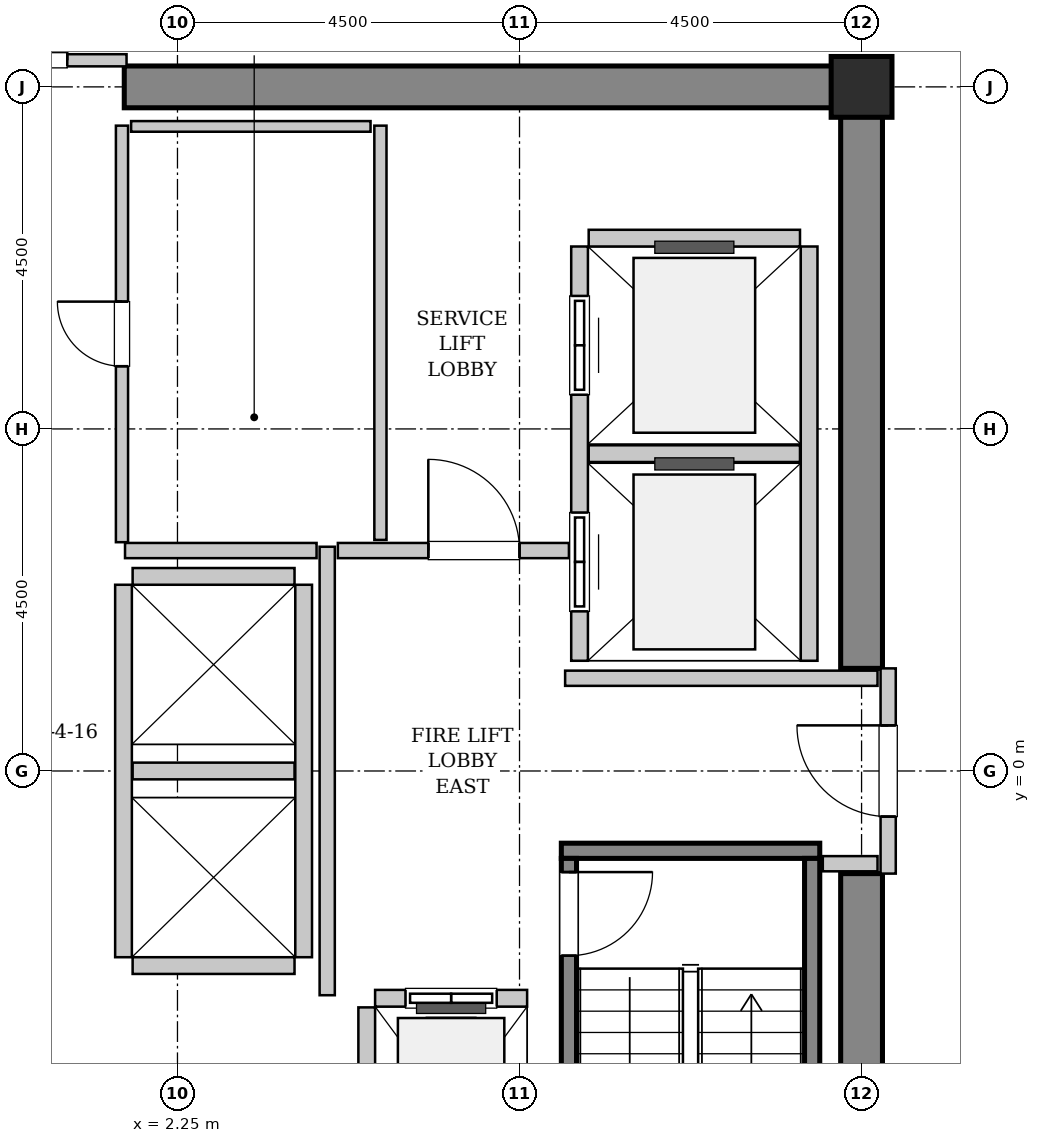
"""IFC4 building model, lengths in metres.
Left out: names, types, materials, properties, quantities, classifications, styles, units other than length and angle.
Written with IfcOpenShell. Run it as: python <this file> out.ifc"""

import sys

from ifc_helpers import new_model, si_unit, direction, frame, frame_2d, origin, origin_2d, place, context, subcontext, project, spatial, rectangle, hollow_rectangle, extrude, source, transform, mapped, element, fill, save


model = new_model("IFC4")
c1 = context("Model", 3, precision=1e-05, world=origin(), true_north=direction((0.0, 1.0)))
c2 = subcontext(c1, "Body", "Model", "MODEL_VIEW")
j1 = project(units=[si_unit("LENGTHUNIT", "METRE"), si_unit("PLANEANGLEUNIT", "RADIAN")], contexts=[c1])
p1 = place(None, origin())
s1 = spatial("IfcSite", under=j1, at=p1, CompositionType="ELEMENT")
p2 = place(p1, origin())
s2 = spatial("IfcBuilding", under=s1, at=p2, CompositionType="ELEMENT")
p3 = place(p2, frame((0.0, 0.0, 194.4)))
s3 = spatial("IfcBuildingStorey", under=s2, at=p3, CompositionType="ELEMENT", Elevation=194.4)
m1 = source(origin(), c2, "Body", "SweptSolid", [
    extrude(rectangle(XDim=9.975, YDim=0.55, at=frame_2d((4.987, 0.0))), origin(), (0.0, 0.0, 1.0), 3.8),
])
p4 = place(p3, frame((1.55, 9.0, 0.0), z_axis=(0.0, 0.0, 1.0), x_axis=(1.0, 0.0, 0.0)))
e1 = element("IfcWall", 1, at=p4, inside=s3, PredefinedType="SHEAR", context=c2, shape_type="MappedRepresentation", body=[
    mapped(m1, transform((0.0, 0.0, 0.0), x_axis=(1.0, 0.0, 0.0), y_axis=(0.0, 1.0, 0.0), z_axis=(0.0, 0.0, 1.0), scale=1.0)),
])
m2 = source(origin(), c2, "Body", "SweptSolid", [
    extrude(rectangle(XDim=7.375, YDim=0.55, at=frame_2d((3.688, 0.0))), origin(), (0.0, 0.0, 1.0), 3.8),
])
for number, where, z_axis, x_axis in (
    (2, (11.25, -8.725, 0.0), (0.0, 0.0, 1.0), (0.0, 1.0, 0.0)),
    (3, (11.25, 1.35, 0.0), (0.0, 0.0, 1.0), (0.0, 1.0, 0.0)),
):
    element("IfcWall", number, at=place(p3, frame(where, z_axis=z_axis, x_axis=x_axis)), inside=s3, PredefinedType="SHEAR", context=c2, shape_type="MappedRepresentation", body=[
        mapped(m2, transform((0.0, 0.0, 0.0), x_axis=(1.0, 0.0, 0.0), y_axis=(0.0, 1.0, 0.0), z_axis=(0.0, 0.0, 1.0), scale=1.0)),
    ])
m3 = source(origin(), c2, "Body", "SweptSolid", [
    extrude(hollow_rectangle(XDim=0.8, YDim=0.8, WallThickness=0.04, InnerFilletRadius=0.04, OuterFilletRadius=0.08, at=origin_2d()), origin(), (0.0, 0.0, 1.0), 3.8),
])
p5 = place(p3, frame((11.25, 9.0, 0.0), z_axis=(0.0, 0.0, 1.0), x_axis=(1.0, 0.0, 0.0)))
e4 = element("IfcColumn", 4, at=p5, inside=s3, PredefinedType="COLUMN", context=c2, shape_type="MappedRepresentation", body=[
    mapped(m3, transform((0.0, 0.0, 0.0), x_axis=(1.0, 0.0, 0.0), y_axis=(0.0, 1.0, 0.0), z_axis=(0.0, 0.0, 1.0), scale=1.0)),
])
m4 = source(origin(), c2, "Body", "SweptSolid", [
    extrude(rectangle(XDim=3.4, YDim=0.2, at=frame_2d((1.7, 0.0))), origin(), (0.0, 0.0, 1.0), 3.8),
])
p6 = place(p3, frame((7.3, -1.05, 0.0), z_axis=(0.0, 0.0, 1.0), x_axis=(1.0, 0.0, 0.0)))
e5 = element("IfcWall", 5, at=p6, inside=s3, PredefinedType="SOLIDWALL", context=c2, shape_type="MappedRepresentation", body=[
    mapped(m4, transform((0.0, 0.0, 0.0), x_axis=(1.0, 0.0, 0.0), y_axis=(0.0, 1.0, 0.0), z_axis=(0.0, 0.0, 1.0), scale=1.0)),
])
m5 = source(origin(), c2, "Body", "SweptSolid", [
    extrude(rectangle(XDim=7.1, YDim=0.2, at=frame_2d((3.55, 0.0))), origin(), (0.0, 0.0, 1.0), 3.8),
])
p7 = place(p3, frame((7.4, -1.15, 0.0), z_axis=(0.0, 0.0, 1.0), x_axis=(0.0, -1.0, 0.0)))
e6 = element("IfcWall", 6, at=p7, inside=s3, PredefinedType="SOLIDWALL", context=c2, shape_type="MappedRepresentation", body=[
    mapped(m5, transform((0.0, 0.0, 0.0), x_axis=(1.0, 0.0, 0.0), y_axis=(0.0, 1.0, 0.0), z_axis=(0.0, 0.0, 1.0), scale=1.0)),
])
p8 = place(p7, frame((0.18, 0.0, 0.0)))
e7 = element("IfcOpeningElement", 7, at=p8, cuts=e6, PredefinedType="OPENING", context=c2, shape_type="SweptSolid", body=[
    extrude(rectangle(XDim=1.1, YDim=2.15, at=frame_2d((0.55, 1.075))), frame((0.0, 0.11, 0.0), z_axis=(0.0, -1.0, 0.0), x_axis=(1.0, 0.0, 0.0)), (0.0, 0.0, 1.0), 0.22),
])
p9 = place(p3, frame((10.6, -1.15, 0.0), z_axis=(0.0, 0.0, 1.0), x_axis=(0.0, -1.0, 0.0)))
e8 = element("IfcWall", 8, at=p9, inside=s3, PredefinedType="SOLIDWALL", context=c2, shape_type="MappedRepresentation", body=[
    mapped(m5, transform((0.0, 0.0, 0.0), x_axis=(1.0, 0.0, 0.0), y_axis=(0.0, 1.0, 0.0), z_axis=(0.0, 0.0, 1.0), scale=1.0)),
])
m6 = source(origin(), c2, "Body", "SweptSolid", [
    extrude(rectangle(XDim=2.0, YDim=0.22, at=frame_2d((1.0, 0.0))), origin(), (0.0, 0.0, 1.0), 3.535),
])
p10 = place(p3, frame((6.85, -2.99, 0.0), z_axis=(0.0, 0.0, 1.0), x_axis=(-1.0, 0.0, 0.0)))
e9 = element("IfcWall", 9, at=p10, inside=s3, PredefinedType="SOLIDWALL", context=c2, shape_type="MappedRepresentation", body=[
    mapped(m6, transform((0.0, 0.0, 0.0), x_axis=(1.0, 0.0, 0.0), y_axis=(0.0, 1.0, 0.0), z_axis=(0.0, 0.0, 1.0), scale=1.0)),
])
p11 = place(p10, frame((0.4, 0.0, 0.0)))
e10 = element("IfcOpeningElement", 10, at=p11, cuts=e9, PredefinedType="OPENING", context=c2, shape_type="SweptSolid", body=[
    extrude(rectangle(XDim=1.2, YDim=2.2, at=frame_2d((0.6, 1.1))), frame((0.0, 0.12, 0.0), z_axis=(0.0, -1.0, 0.0), x_axis=(1.0, 0.0, 0.0)), (0.0, 0.0, 1.0), 0.24),
])
m7 = source(origin(), c2, "Body", "SweptSolid", [
    extrude(rectangle(XDim=2.68, YDim=0.22, at=frame_2d((1.34, 0.0))), origin(), (0.0, 0.0, 1.0), 3.535),
])
p12 = place(p3, frame((4.74, -3.11, 0.0), z_axis=(0.0, 0.0, 1.0), x_axis=(0.0, -1.0, 0.0)))
e11 = element("IfcWall", 11, at=p12, inside=s3, PredefinedType="SOLIDWALL", context=c2, shape_type="MappedRepresentation", body=[
    mapped(m7, transform((0.0, 0.0, 0.0), x_axis=(1.0, 0.0, 0.0), y_axis=(0.0, 1.0, 0.0), z_axis=(0.0, 0.0, 1.0), scale=1.0)),
])
m8 = source(origin(), c2, "Body", "SweptSolid", [
    extrude(rectangle(XDim=5.45, YDim=0.22, at=frame_2d((2.725, 0.0))), origin(), (0.0, 0.0, 1.0), 3.535),
])
p13 = place(p3, frame((7.54, 6.9, 0.0), z_axis=(0.0, 0.0, 1.0), x_axis=(0.0, -1.0, 0.0)))
e12 = element("IfcWall", 12, at=p13, inside=s3, PredefinedType="SOLIDWALL", context=c2, shape_type="MappedRepresentation", body=[
    mapped(m8, transform((0.0, 0.0, 0.0), x_axis=(1.0, 0.0, 0.0), y_axis=(0.0, 1.0, 0.0), z_axis=(0.0, 0.0, 1.0), scale=1.0)),
])
p14 = place(p13, frame((3.5, 0.0, 0.0)))
e13 = element("IfcOpeningElement", 13, at=p14, cuts=e12, PredefinedType="OPENING", context=c2, shape_type="SweptSolid", body=[
    extrude(rectangle(XDim=1.3, YDim=2.3, at=frame_2d((0.65, 1.15))), frame((0.0, 0.12, 0.0), z_axis=(0.0, -1.0, 0.0), x_axis=(1.0, 0.0, 0.0)), (0.0, 0.0, 1.0), 0.24),
])
p15 = place(p13, frame((0.65, 0.0, 0.0)))
e14 = element("IfcOpeningElement", 14, at=p15, cuts=e12, PredefinedType="OPENING", context=c2, shape_type="SweptSolid", body=[
    extrude(rectangle(XDim=1.3, YDim=2.3, at=frame_2d((0.65, 1.15))), frame((0.0, 0.12, 0.0), z_axis=(0.0, -1.0, 0.0), x_axis=(1.0, 0.0, 0.0)), (0.0, 0.0, 1.0), 0.24),
])
p16 = place(p3, frame((10.56, 1.45, 0.0), z_axis=(0.0, 0.0, 1.0), x_axis=(0.0, 1.0, 0.0)))
e15 = element("IfcWall", 15, at=p16, inside=s3, PredefinedType="SOLIDWALL", context=c2, shape_type="MappedRepresentation", body=[
    mapped(m8, transform((0.0, 0.0, 0.0), x_axis=(1.0, 0.0, 0.0), y_axis=(0.0, 1.0, 0.0), z_axis=(0.0, 0.0, 1.0), scale=1.0)),
])
m9 = source(origin(), c2, "Body", "SweptSolid", [
    extrude(rectangle(XDim=2.78, YDim=0.22, at=frame_2d((1.39, 0.0))), origin(), (0.0, 0.0, 1.0), 3.535),
])
for number, where, z_axis, x_axis in (
    (16, (7.66, 4.175, 0.0), (0.0, 0.0, 1.0), (1.0, 0.0, 0.0)),
    (17, (10.44, 7.01, 0.0), (0.0, 0.0, 1.0), (-1.0, 0.0, 0.0)),
):
    element("IfcWall", number, at=place(p3, frame(where, z_axis=z_axis, x_axis=x_axis)), inside=s3, PredefinedType="SOLIDWALL", context=c2, shape_type="MappedRepresentation", body=[
        mapped(m9, transform((0.0, 0.0, 0.0), x_axis=(1.0, 0.0, 0.0), y_axis=(0.0, 1.0, 0.0), z_axis=(0.0, 0.0, 1.0), scale=1.0)),
    ])
m10 = source(origin(), c2, "Body", "SweptSolid", [
    extrude(rectangle(XDim=4.9, YDim=0.22, at=frame_2d((2.45, 0.0))), origin(), (0.0, 0.0, 1.0), 3.535),
])
for number, where, z_axis, x_axis in (
    (18, (1.54, 2.45, 0.0), (0.0, 0.0, 1.0), (0.0, -1.0, 0.0)),
    (19, (3.91, -2.45, 0.0), (0.0, 0.0, 1.0), (0.0, 1.0, 0.0)),
):
    element("IfcWall", number, at=place(p3, frame(where, z_axis=z_axis, x_axis=x_axis)), inside=s3, PredefinedType="SOLIDWALL", context=c2, shape_type="MappedRepresentation", body=[
        mapped(m10, transform((0.0, 0.0, 0.0), x_axis=(1.0, 0.0, 0.0), y_axis=(0.0, 1.0, 0.0), z_axis=(0.0, 0.0, 1.0), scale=1.0)),
    ])
m11 = source(origin(), c2, "Body", "SweptSolid", [
    extrude(rectangle(XDim=2.13, YDim=0.22, at=frame_2d((1.065, 0.0))), origin(), (0.0, 0.0, 1.0), 3.535),
])
for number, where, z_axis, x_axis in (
    (20, (1.66, -2.56, 0.0), (0.0, 0.0, 1.0), (1.0, 0.0, 0.0)),
    (21, (1.66, 0.0, 0.0), (0.0, 0.0, 1.0), (1.0, 0.0, 0.0)),
    (22, (3.79, 2.56, 0.0), (0.0, 0.0, 1.0), (-1.0, 0.0, 0.0)),
):
    element("IfcWall", number, at=place(p3, frame(where, z_axis=z_axis, x_axis=x_axis)), inside=s3, PredefinedType="SOLIDWALL", context=c2, shape_type="MappedRepresentation", body=[
        mapped(m11, transform((0.0, 0.0, 0.0), x_axis=(1.0, 0.0, 0.0), y_axis=(0.0, 1.0, 0.0), z_axis=(0.0, 0.0, 1.0), scale=1.0)),
    ])
m12 = source(origin(), c2, "Body", "SweptSolid", [
    extrude(rectangle(XDim=2.7, YDim=0.2, at=frame_2d((1.35, 0.0))), origin(), (0.0, 0.0, 1.0), 2.425),
])
p17 = place(p3, frame((11.6, -1.35, 0.0), z_axis=(0.0, 0.0, 1.0), x_axis=(0.0, 1.0, 0.0)))
e23 = element("IfcWall", 23, at=p17, inside=s3, PredefinedType="PARTITIONING", context=c2, shape_type="MappedRepresentation", body=[
    mapped(m12, transform((0.0, 0.0, 0.0), x_axis=(1.0, 0.0, 0.0), y_axis=(0.0, 1.0, 0.0), z_axis=(0.0, 0.0, 1.0), scale=1.0)),
])
p18 = place(p17, frame((0.75, 0.0, 0.0)))
e24 = element("IfcOpeningElement", 24, at=p18, cuts=e23, PredefinedType="OPENING", context=c2, shape_type="SweptSolid", body=[
    extrude(rectangle(XDim=1.2, YDim=2.15, at=frame_2d((0.6, 1.075))), frame((0.0, 0.11, 0.0), z_axis=(0.0, -1.0, 0.0), x_axis=(1.0, 0.0, 0.0)), (0.0, 0.0, 1.0), 0.22),
])
m13 = source(origin(), c2, "Body", "SweptSolid", [
    extrude(rectangle(XDim=5.9, YDim=0.2, at=frame_2d((2.95, 0.0))), origin(), (0.0, 0.0, 1.0), 3.535),
])
p19 = place(p3, frame((4.22, -2.95, 0.0), z_axis=(0.0, 0.0, 1.0), x_axis=(0.0, 1.0, 0.0)))
e25 = element("IfcWall", 25, at=p19, inside=s3, PredefinedType="PARTITIONING", context=c2, shape_type="MappedRepresentation", body=[
    mapped(m13, transform((0.0, 0.0, 0.0), x_axis=(1.0, 0.0, 0.0), y_axis=(0.0, 1.0, 0.0), z_axis=(0.0, 0.0, 1.0), scale=1.0)),
])
m14 = source(origin(), c2, "Body", "SweptSolid", [
    extrude(rectangle(XDim=2.52, YDim=0.2, at=frame_2d((1.26, 0.0))), origin(), (0.0, 0.0, 1.0), 3.535),
])
p20 = place(p3, frame((1.56, 2.9, 0.0), z_axis=(0.0, 0.0, 1.0), x_axis=(1.0, 0.0, 0.0)))
e26 = element("IfcWall", 26, at=p20, inside=s3, PredefinedType="PARTITIONING", context=c2, shape_type="MappedRepresentation", body=[
    mapped(m14, transform((0.0, 0.0, 0.0), x_axis=(1.0, 0.0, 0.0), y_axis=(0.0, 1.0, 0.0), z_axis=(0.0, 0.0, 1.0), scale=1.0)),
])
m15 = source(origin(), c2, "Body", "SweptSolid", [
    extrude(rectangle(XDim=3.04, YDim=0.2, at=frame_2d((1.52, 0.0))), origin(), (0.0, 0.0, 1.0), 3.535),
])
p21 = place(p3, frame((4.36, 2.9, 0.0), z_axis=(0.0, 0.0, 1.0), x_axis=(1.0, 0.0, 0.0)))
e27 = element("IfcWall", 27, at=p21, inside=s3, PredefinedType="PARTITIONING", context=c2, shape_type="MappedRepresentation", body=[
    mapped(m15, transform((0.0, 0.0, 0.0), x_axis=(1.0, 0.0, 0.0), y_axis=(0.0, 1.0, 0.0), z_axis=(0.0, 0.0, 1.0), scale=1.0)),
])
p22 = place(p21, frame((1.19, 0.0, 0.0)))
e28 = element("IfcOpeningElement", 28, at=p22, cuts=e27, PredefinedType="OPENING", context=c2, shape_type="SweptSolid", body=[
    extrude(rectangle(XDim=1.2, YDim=2.15, at=frame_2d((0.6, 1.075))), frame((0.0, 0.11, 0.0), z_axis=(0.0, -1.0, 0.0), x_axis=(1.0, 0.0, 0.0)), (0.0, 0.0, 1.0), 0.22),
])
m16 = source(origin(), c2, "Body", "SweptSolid", [
    extrude(rectangle(XDim=4.11, YDim=0.2, at=frame_2d((2.055, 0.0))), origin(), (0.0, 0.0, 1.0), 3.535),
])
p23 = place(p3, frame((7.35, 1.22, 0.0), z_axis=(0.0, 0.0, 1.0), x_axis=(1.0, 0.0, 0.0)))
e29 = element("IfcWall", 29, at=p23, inside=s3, PredefinedType="PARTITIONING", context=c2, shape_type="MappedRepresentation", body=[
    mapped(m16, transform((0.0, 0.0, 0.0), x_axis=(1.0, 0.0, 0.0), y_axis=(0.0, 1.0, 0.0), z_axis=(0.0, 0.0, 1.0), scale=1.0)),
])
m17 = source(origin(), c2, "Body", "SweptSolid", [
    extrude(rectangle(XDim=0.72, YDim=0.2, at=frame_2d((0.36, 0.0))), origin(), (0.0, 0.0, 1.0), 3.535),
])
p24 = place(p3, frame((10.74, -1.22, 0.0), z_axis=(0.0, 0.0, 1.0), x_axis=(1.0, 0.0, 0.0)))
e30 = element("IfcWall", 30, at=p24, inside=s3, PredefinedType="PARTITIONING", context=c2, shape_type="MappedRepresentation", body=[
    mapped(m17, transform((0.0, 0.0, 0.0), x_axis=(1.0, 0.0, 0.0), y_axis=(0.0, 1.0, 0.0), z_axis=(0.0, 0.0, 1.0), scale=1.0)),
])
m18 = source(origin(), c2, "Body", "SweptSolid", [
    extrude(rectangle(XDim=3.16, YDim=0.16, at=frame_2d((1.58, 0.0))), origin(), (0.0, 0.0, 1.0), 2.425),
])
p25 = place(p3, frame((-1.58, 9.35, 0.0), z_axis=(0.0, 0.0, 1.0), x_axis=(1.0, 0.0, 0.0)))
e31 = element("IfcWall", 31, at=p25, inside=s3, PredefinedType="PARTITIONING", context=c2, shape_type="MappedRepresentation", body=[
    mapped(m18, transform((0.0, 0.0, 0.0), x_axis=(1.0, 0.0, 0.0), y_axis=(0.0, 1.0, 0.0), z_axis=(0.0, 0.0, 1.0), scale=1.0)),
])
p26 = place(p25, frame((0.78, 0.0, 0.0)))
e32 = element("IfcOpeningElement", 32, at=p26, cuts=e31, PredefinedType="OPENING", context=c2, shape_type="SweptSolid", body=[
    extrude(rectangle(XDim=1.6, YDim=2.3, at=frame_2d((0.8, 1.15))), frame((0.0, 0.09, 0.0), z_axis=(0.0, -1.0, 0.0), x_axis=(1.0, 0.0, 0.0)), (0.0, 0.0, 1.0), 0.18),
])
m19 = source(origin(), c2, "Body", "SweptSolid", [
    extrude(rectangle(XDim=5.45, YDim=0.16, at=frame_2d((2.725, 0.0))), origin(), (0.0, 0.0, 1.0), 3.535),
])
p27 = place(p3, frame((4.92, 3.04, 0.0), z_axis=(0.0, 0.0, 1.0), x_axis=(0.0, 1.0, 0.0)))
e33 = element("IfcWall", 33, at=p27, inside=s3, PredefinedType="PARTITIONING", context=c2, shape_type="MappedRepresentation", body=[
    mapped(m19, transform((0.0, 0.0, 0.0), x_axis=(1.0, 0.0, 0.0), y_axis=(0.0, 1.0, 0.0), z_axis=(0.0, 0.0, 1.0), scale=1.0)),
])
m20 = source(origin(), c2, "Body", "SweptSolid", [
    extrude(rectangle(XDim=5.48, YDim=0.16, at=frame_2d((2.74, 0.0))), origin(), (0.0, 0.0, 1.0), 3.535),
])
p28 = place(p3, frame((1.52, 3.01, 0.0), z_axis=(0.0, 0.0, 1.0), x_axis=(0.0, 1.0, 0.0)))
e34 = element("IfcWall", 34, at=p28, inside=s3, PredefinedType="PARTITIONING", context=c2, shape_type="MappedRepresentation", body=[
    mapped(m20, transform((0.0, 0.0, 0.0), x_axis=(1.0, 0.0, 0.0), y_axis=(0.0, 1.0, 0.0), z_axis=(0.0, 0.0, 1.0), scale=1.0)),
])
p29 = place(p28, frame((2.315, 0.0, 0.0)))
e35 = element("IfcOpeningElement", 35, at=p29, cuts=e34, PredefinedType="OPENING", context=c2, shape_type="SweptSolid", body=[
    extrude(rectangle(XDim=0.85, YDim=2.1, at=frame_2d((0.425, 1.05))), frame((0.0, 0.09, 0.0), z_axis=(0.0, -1.0, 0.0), x_axis=(1.0, 0.0, 0.0)), (0.0, 0.0, 1.0), 0.18),
])
m21 = source(origin(), c2, "Body", "SweptSolid", [
    extrude(rectangle(XDim=3.15, YDim=0.14, at=frame_2d((1.575, 0.0))), origin(), (0.0, 0.0, 1.0), 3.535),
])
p30 = place(p3, frame((1.64, 8.48, 0.0), z_axis=(0.0, 0.0, 1.0), x_axis=(1.0, 0.0, 0.0)))
e36 = element("IfcWall", 36, at=p30, inside=s3, PredefinedType="PARTITIONING", context=c2, shape_type="MappedRepresentation", body=[
    mapped(m21, transform((0.0, 0.0, 0.0), x_axis=(1.0, 0.0, 0.0), y_axis=(0.0, 1.0, 0.0), z_axis=(0.0, 0.0, 1.0), scale=1.0)),
])
m22 = source(origin(), c2, "Body", "SweptSolid", [
    extrude(rectangle(XDim=1.1, YDim=2.15, at=frame_2d((0.55, 1.075))), frame((0.0, 0.025, 0.0), z_axis=(0.0, -1.0, 0.0), x_axis=(1.0, 0.0, 0.0)), (0.0, 0.0, 1.0), 0.05),
])
p31 = place(p8, origin())
e37 = element("IfcDoor", 37, at=p31, inside=s3, OperationType="SINGLE_SWING_LEFT", PredefinedType="DOOR", context=c2, shape_type="MappedRepresentation", body=[
    mapped(m22, transform((0.0, 0.0, 0.0), x_axis=(1.0, 0.0, 0.0), y_axis=(0.0, 1.0, 0.0), z_axis=(0.0, 0.0, 1.0), scale=1.0)),
])
fill(e7, e37)
m23 = source(origin(), c2, "Body", "SweptSolid", [
    extrude(rectangle(XDim=1.2, YDim=2.2, at=frame_2d((0.6, 1.1))), frame((0.0, 0.025, 0.0), z_axis=(0.0, -1.0, 0.0), x_axis=(1.0, 0.0, 0.0)), (0.0, 0.0, 1.0), 0.05),
])
p32 = place(p11, origin())
e38 = element("IfcDoor", 38, at=p32, inside=s3, OperationType="SLIDING_TO_LEFT", PredefinedType="DOOR", context=c2, shape_type="MappedRepresentation", body=[
    mapped(m23, transform((0.0, 0.0, 0.0), x_axis=(1.0, 0.0, 0.0), y_axis=(0.0, 1.0, 0.0), z_axis=(0.0, 0.0, 1.0), scale=1.0)),
])
fill(e10, e38)
m24 = source(origin(), c2, "Body", "SweptSolid", [
    extrude(rectangle(XDim=1.3, YDim=2.3, at=frame_2d((0.65, 1.15))), frame((0.0, 0.025, 0.0), z_axis=(0.0, -1.0, 0.0), x_axis=(1.0, 0.0, 0.0)), (0.0, 0.0, 1.0), 0.05),
])
p33 = place(p14, origin())
e39 = element("IfcDoor", 39, at=p33, inside=s3, OperationType="SLIDING_TO_RIGHT", PredefinedType="DOOR", context=c2, shape_type="MappedRepresentation", body=[
    mapped(m24, transform((0.0, 0.0, 0.0), x_axis=(1.0, 0.0, 0.0), y_axis=(0.0, 1.0, 0.0), z_axis=(0.0, 0.0, 1.0), scale=1.0)),
])
fill(e13, e39)
p34 = place(p15, origin())
e40 = element("IfcDoor", 40, at=p34, inside=s3, OperationType="SLIDING_TO_RIGHT", PredefinedType="DOOR", context=c2, shape_type="MappedRepresentation", body=[
    mapped(m24, transform((0.0, 0.0, 0.0), x_axis=(1.0, 0.0, 0.0), y_axis=(0.0, 1.0, 0.0), z_axis=(0.0, 0.0, 1.0), scale=1.0)),
])
fill(e14, e40)
m25 = source(origin(), c2, "Body", "SweptSolid", [
    extrude(rectangle(XDim=1.2, YDim=2.15, at=frame_2d((0.6, 1.075))), frame((0.0, 0.025, 0.0), z_axis=(0.0, -1.0, 0.0), x_axis=(1.0, 0.0, 0.0)), (0.0, 0.0, 1.0), 0.05),
])
p35 = place(p18, origin())
e41 = element("IfcDoor", 41, at=p35, inside=s3, OperationType="SINGLE_SWING_RIGHT", PredefinedType="DOOR", context=c2, shape_type="MappedRepresentation", body=[
    mapped(m25, transform((0.0, 0.0, 0.0), x_axis=(1.0, 0.0, 0.0), y_axis=(0.0, 1.0, 0.0), z_axis=(0.0, 0.0, 1.0), scale=1.0)),
])
fill(e24, e41)
p36 = place(p22, origin())
e42 = element("IfcDoor", 42, at=p36, inside=s3, OperationType="SINGLE_SWING_LEFT", PredefinedType="DOOR", context=c2, shape_type="MappedRepresentation", body=[
    mapped(m25, transform((0.0, 0.0, 0.0), x_axis=(1.0, 0.0, 0.0), y_axis=(0.0, 1.0, 0.0), z_axis=(0.0, 0.0, 1.0), scale=1.0)),
])
fill(e28, e42)
m26 = source(origin(), c2, "Body", "SweptSolid", [
    extrude(rectangle(XDim=1.6, YDim=2.3, at=frame_2d((0.8, 1.15))), frame((0.0, 0.025, 0.0), z_axis=(0.0, -1.0, 0.0), x_axis=(1.0, 0.0, 0.0)), (0.0, 0.0, 1.0), 0.05),
])
p37 = place(p26, origin())
e43 = element("IfcDoor", 43, at=p37, inside=s3, OperationType="DOUBLE_DOOR_SINGLE_SWING", PredefinedType="DOOR", context=c2, shape_type="MappedRepresentation", body=[
    mapped(m26, transform((0.0, 0.0, 0.0), x_axis=(1.0, 0.0, 0.0), y_axis=(0.0, 1.0, 0.0), z_axis=(0.0, 0.0, 1.0), scale=1.0)),
])
fill(e32, e43)
m27 = source(origin(), c2, "Body", "SweptSolid", [
    extrude(rectangle(XDim=0.85, YDim=2.1, at=frame_2d((0.425, 1.05))), frame((0.0, 0.025, 0.0), z_axis=(0.0, -1.0, 0.0), x_axis=(1.0, 0.0, 0.0)), (0.0, 0.0, 1.0), 0.05),
])
p38 = place(p29, origin())
e44 = element("IfcDoor", 44, at=p38, inside=s3, OperationType="SINGLE_SWING_RIGHT", PredefinedType="DOOR", context=c2, shape_type="MappedRepresentation", body=[
    mapped(m27, transform((0.0, 0.0, 0.0), x_axis=(1.0, 0.0, 0.0), y_axis=(0.0, 1.0, 0.0), z_axis=(0.0, 0.0, 1.0), scale=1.0)),
])
fill(e35, e44)
save(model, sys.argv[1])
